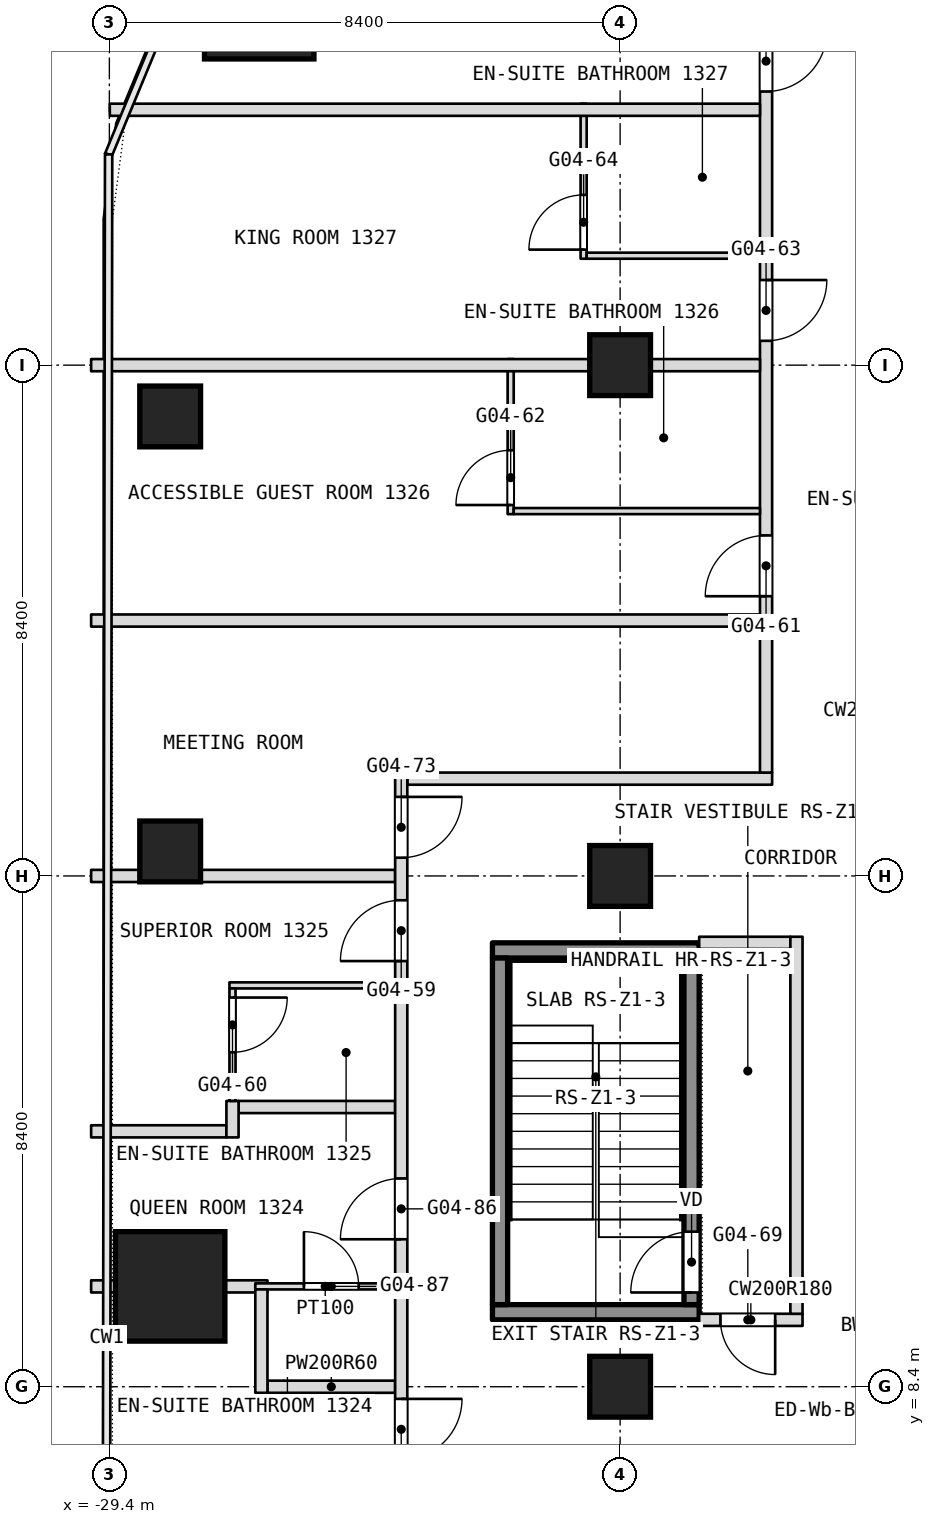
"""IFC4 building model, lengths in metres.
Left out: names, types, materials, properties, quantities, classifications, styles, units other than length and angle.
Written with IfcOpenShell. Run it as: python <this file> out.ifc"""

import sys

from ifc_helpers import new_model, si_unit, direction, frame, frame_2d, origin, origin_2d, place, context, subcontext, project, spatial, rectangle, extrude, element, fill, save


model = new_model("IFC4")
c1 = context("Model", 3, precision=1e-05, world=origin(), true_north=direction((0.0, 1.0)))
c2 = subcontext(c1, "Body", "Model", "MODEL_VIEW")
j1 = project(units=[si_unit("LENGTHUNIT", "METRE"), si_unit("PLANEANGLEUNIT", "RADIAN")], contexts=[c1])
p1 = place(None, origin())
s1 = spatial("IfcSite", under=j1, at=p1, CompositionType="ELEMENT")
p2 = place(p1, origin())
s2 = spatial("IfcBuilding", under=s1, at=p2, CompositionType="ELEMENT")
p3 = place(p2, frame((0.0, 0.0, 61.7)))
s3 = spatial("IfcBuildingStorey", under=s2, at=p3, CompositionType="ELEMENT", Elevation=61.7)
for number, where, z_axis, x_axis in (
    (1, (-26.936, 31.135, 0.0), (0.0, 0.0, 1.0), (1.0, 0.0, 0.0)),
    (2, (-28.4, 10.05, 0.0), (0.0, 0.0, 1.0), (1.0, 0.0, 0.0)),
):
    element("IfcColumn", number, at=place(p3, frame(where, z_axis=z_axis, x_axis=x_axis)), inside=s3, PredefinedType="COLUMN", context=c2, shape_type="SweptSolid", body=[
        extrude(rectangle(XDim=1.8, YDim=1.8, at=origin_2d()), origin(), (0.0, 0.0, 1.0), 3.6),
    ])
for number, where, z_axis, x_axis in (
    (3, (-21.0, 8.4, 0.0), (0.0, 0.0, 1.0), (1.0, 0.0, 0.0)),
    (4, (-21.0, 16.8, 0.0), (0.0, 0.0, 1.0), (1.0, 0.0, 0.0)),
    (5, (-21.0, 25.2, 0.0), (0.0, 0.0, 1.0), (1.0, 0.0, 0.0)),
    (6, (-28.4, 17.203, 0.0), (0.0, 0.0, 1.0), (1.0, 0.0, 0.0)),
    (7, (-28.4, 24.356, 0.0), (0.0, 0.0, 1.0), (1.0, 0.0, 0.0)),
):
    element("IfcColumn", number, at=place(p3, frame(where, z_axis=z_axis, x_axis=x_axis)), inside=s3, PredefinedType="COLUMN", context=c2, shape_type="SweptSolid", body=[
        extrude(rectangle(XDim=1.0, YDim=1.0, at=origin_2d()), origin(), (0.0, 0.0, 1.0), 3.6),
    ])
p4 = place(p3, frame((-26.8, 8.4, 0.0), z_axis=(0.0, 0.0, 1.0), x_axis=(1.0, 0.0, 0.0)))
e8 = element("IfcWall", 8, at=p4, inside=s3, PredefinedType="PARTITIONING", context=c2, shape_type="SweptSolid", body=[
    extrude(rectangle(XDim=2.1, YDim=0.2, at=frame_2d((1.05, 0.0))), origin(), (0.0, 0.0, 1.0), 2.84),
])
p5 = place(p3, frame((-19.7, 9.5, 0.0), z_axis=(0.0, 0.0, 1.0), x_axis=(1.0, 0.0, 0.0)))
e9 = element("IfcWall", 9, at=p5, inside=s3, PredefinedType="PARTITIONING", context=c2, shape_type="SweptSolid", body=[
    extrude(rectangle(XDim=1.7, YDim=0.2, at=frame_2d((0.85, 0.0))), origin(), (0.0, 0.0, 1.0), 3.34),
])
p6 = place(p5, frame((0.35, 0.0, 0.0)))
e10 = element("IfcOpeningElement", 10, at=p6, cuts=e9, PredefinedType="OPENING", context=c2, shape_type="SweptSolid", body=[
    extrude(rectangle(XDim=0.9, YDim=2.1, at=frame_2d((0.45, 1.05))), frame((0.0, 0.1, 0.0), z_axis=(0.0, -1.0, 0.0), x_axis=(1.0, 0.0, 0.0)), (0.0, 0.0, 1.0), 0.2),
])
p7 = place(p3, frame((-29.7, 10.05, 0.0), z_axis=(0.0, 0.0, 1.0), x_axis=(1.0, 0.0, 0.0)))
e11 = element("IfcWall", 11, at=p7, inside=s3, PredefinedType="PARTITIONING", context=c2, shape_type="SweptSolid", body=[
    extrude(rectangle(XDim=0.4, YDim=0.2, at=frame_2d((0.2, 0.0))), origin(), (0.0, 0.0, 1.0), 3.34),
])
p8 = place(p3, frame((-27.5, 10.05, 0.0), z_axis=(0.0, 0.0, 1.0), x_axis=(1.0, 0.0, 0.0)))
e12 = element("IfcWall", 12, at=p8, inside=s3, PredefinedType="PARTITIONING", context=c2, shape_type="SweptSolid", body=[
    extrude(rectangle(XDim=0.7, YDim=0.2, at=frame_2d((0.35, 0.0))), origin(), (0.0, 0.0, 1.0), 3.34),
])
p9 = place(p3, frame((-27.0, 10.05, 0.0), z_axis=(0.0, 0.0, 1.0), x_axis=(1.0, 0.0, 0.0)))
e13 = element("IfcWall", 13, at=p9, inside=s3, PredefinedType="PARTITIONING", context=c2, shape_type="SweptSolid", body=[
    extrude(rectangle(XDim=2.3, YDim=0.1, at=frame_2d((1.15, 0.0))), origin(), (0.0, 0.0, 1.0), 3.34),
])
p10 = place(p9, frame((0.8, 0.0, 0.0)))
e14 = element("IfcOpeningElement", 14, at=p10, cuts=e13, PredefinedType="OPENING", context=c2, shape_type="SweptSolid", body=[
    extrude(rectangle(XDim=0.9, YDim=2.1, at=frame_2d((0.45, 1.05))), frame((0.0, 0.05, 0.0), z_axis=(0.0, -1.0, 0.0), x_axis=(1.0, 0.0, 0.0)), (0.0, 0.0, 1.0), 0.1),
])
p11 = place(p3, frame((-29.7, 12.6, 0.0), z_axis=(0.0, 0.0, 1.0), x_axis=(1.0, 0.0, 0.0)))
e15 = element("IfcWall", 15, at=p11, inside=s3, PredefinedType="PARTITIONING", context=c2, shape_type="SweptSolid", body=[
    extrude(rectangle(XDim=2.225, YDim=0.2, at=frame_2d((1.112, 0.0))), origin(), (0.0, 0.0, 1.0), 3.34),
])
p12 = place(p3, frame((-27.275, 13.0, 0.0), z_axis=(0.0, 0.0, 1.0), x_axis=(1.0, 0.0, 0.0)))
e16 = element("IfcWall", 16, at=p12, inside=s3, PredefinedType="PARTITIONING", context=c2, shape_type="SweptSolid", body=[
    extrude(rectangle(XDim=2.575, YDim=0.2, at=frame_2d((1.288, 0.0))), origin(), (0.0, 0.0, 1.0), 3.34),
])
p13 = place(p3, frame((-27.425, 15.0, 0.0), z_axis=(0.0, 0.0, 1.0), x_axis=(1.0, 0.0, 0.0)))
e17 = element("IfcWall", 17, at=p13, inside=s3, PredefinedType="PARTITIONING", context=c2, shape_type="SweptSolid", body=[
    extrude(rectangle(XDim=2.725, YDim=0.1, at=frame_2d((1.363, 0.0))), origin(), (0.0, 0.0, 1.0), 3.34),
])
p14 = place(p3, frame((-19.7, 15.7, 0.0), z_axis=(0.0, 0.0, 1.0), x_axis=(1.0, 0.0, 0.0)))
e18 = element("IfcWall", 18, at=p14, inside=s3, PredefinedType="PARTITIONING", context=c2, shape_type="SweptSolid", body=[
    extrude(rectangle(XDim=1.5, YDim=0.2, at=frame_2d((0.75, 0.0))), origin(), (0.0, 0.0, 1.0), 3.34),
])
p15 = place(p3, frame((-29.7, 16.8, 0.0), z_axis=(0.0, 0.0, 1.0), x_axis=(1.0, 0.0, 0.0)))
e19 = element("IfcWall", 19, at=p15, inside=s3, PredefinedType="PARTITIONING", context=c2, shape_type="SweptSolid", body=[
    extrude(rectangle(XDim=5.0, YDim=0.2, at=frame_2d((2.5, 0.0))), origin(), (0.0, 0.0, 1.0), 2.84),
])
p16 = place(p3, frame((-18.1, 9.6, 0.0), z_axis=(0.0, 0.0, 1.0), x_axis=(0.0, 1.0, 0.0)))
e20 = element("IfcWall", 20, at=p16, inside=s3, PredefinedType="PARTITIONING", context=c2, shape_type="SweptSolid", body=[
    extrude(rectangle(XDim=6.2, YDim=0.2, at=frame_2d((3.1, 0.0))), origin(), (0.0, 0.0, 1.0), 3.34),
])
p17 = place(p3, frame((-24.5, 18.4, 0.0), z_axis=(0.0, 0.0, 1.0), x_axis=(1.0, 0.0, 0.0)))
e21 = element("IfcWall", 21, at=p17, inside=s3, PredefinedType="PARTITIONING", context=c2, shape_type="SweptSolid", body=[
    extrude(rectangle(XDim=6.0, YDim=0.2, at=frame_2d((3.0, 0.0))), origin(), (0.0, 0.0, 1.0), 3.34),
])
p18 = place(p3, frame((-18.6, 18.5, 0.0), z_axis=(0.0, 0.0, 1.0), x_axis=(0.0, 1.0, 0.0)))
e22 = element("IfcWall", 22, at=p18, inside=s3, PredefinedType="PARTITIONING", context=c2, shape_type="SweptSolid", body=[
    extrude(rectangle(XDim=15.04, YDim=0.2, at=frame_2d((7.52, 0.0))), origin(), (0.0, 0.0, 1.0), 3.34),
])
p19 = place(p18, frame((2.9, 0.0, 0.0)))
e23 = element("IfcOpeningElement", 23, at=p19, cuts=e22, PredefinedType="OPENING", context=c2, shape_type="SweptSolid", body=[
    extrude(rectangle(XDim=1.0, YDim=2.1, at=frame_2d((0.5, 1.05))), frame((0.0, 0.1, 0.0), z_axis=(0.0, -1.0, 0.0), x_axis=(1.0, 0.0, 0.0)), (0.0, 0.0, 1.0), 0.2),
])
p20 = place(p18, frame((7.1, 0.0, 0.0)))
e24 = element("IfcOpeningElement", 24, at=p20, cuts=e22, PredefinedType="OPENING", context=c2, shape_type="SweptSolid", body=[
    extrude(rectangle(XDim=1.0, YDim=2.1, at=frame_2d((0.5, 1.05))), frame((0.0, 0.1, 0.0), z_axis=(0.0, -1.0, 0.0), x_axis=(1.0, 0.0, 0.0)), (0.0, 0.0, 1.0), 0.2),
])
p21 = place(p18, frame((11.2, 0.0, 0.0)))
e25 = element("IfcOpeningElement", 25, at=p21, cuts=e22, PredefinedType="OPENING", context=c2, shape_type="SweptSolid", body=[
    extrude(rectangle(XDim=1.0, YDim=2.1, at=frame_2d((0.5, 1.05))), frame((0.0, 0.1, 0.0), z_axis=(0.0, -1.0, 0.0), x_axis=(1.0, 0.0, 0.0)), (0.0, 0.0, 1.0), 0.2),
])
p22 = place(p3, frame((-29.7, 21.0, 0.0), z_axis=(0.0, 0.0, 1.0), x_axis=(1.0, 0.0, 0.0)))
e26 = element("IfcWall", 26, at=p22, inside=s3, PredefinedType="PARTITIONING", context=c2, shape_type="SweptSolid", body=[
    extrude(rectangle(XDim=11.0, YDim=0.2, at=frame_2d((5.5, 0.0))), origin(), (0.0, 0.0, 1.0), 3.34),
])
p23 = place(p3, frame((-21.6, 26.95, 0.0), z_axis=(0.0, 0.0, 1.0), x_axis=(0.0, 1.0, 0.0)))
e27 = element("IfcWall", 27, at=p23, inside=s3, PredefinedType="PARTITIONING", context=c2, shape_type="SweptSolid", body=[
    extrude(rectangle(XDim=2.55, YDim=0.1, at=frame_2d((1.275, 0.0))), origin(), (0.0, 0.0, 1.0), 3.34),
])
p24 = place(p23, frame((0.15, 0.0, 0.0)))
e28 = element("IfcOpeningElement", 28, at=p24, cuts=e27, PredefinedType="OPENING", context=c2, shape_type="SweptSolid", body=[
    extrude(rectangle(XDim=0.9, YDim=2.1, at=frame_2d((0.45, 1.05))), frame((0.0, 0.05, 0.0), z_axis=(0.0, -1.0, 0.0), x_axis=(1.0, 0.0, 0.0)), (0.0, 0.0, 1.0), 0.1),
])
p25 = place(p3, frame((-22.8, 22.75, 0.0), z_axis=(0.0, 0.0, 1.0), x_axis=(0.0, 1.0, 0.0)))
e29 = element("IfcWall", 29, at=p25, inside=s3, PredefinedType="PARTITIONING", context=c2, shape_type="SweptSolid", body=[
    extrude(rectangle(XDim=2.55, YDim=0.1, at=frame_2d((1.275, 0.0))), origin(), (0.0, 0.0, 1.0), 3.34),
])
p26 = place(p25, frame((0.15, 0.0, 0.0)))
e30 = element("IfcOpeningElement", 30, at=p26, cuts=e29, PredefinedType="OPENING", context=c2, shape_type="SweptSolid", body=[
    extrude(rectangle(XDim=0.9, YDim=2.1, at=frame_2d((0.45, 1.05))), frame((0.0, 0.05, 0.0), z_axis=(0.0, -1.0, 0.0), x_axis=(1.0, 0.0, 0.0)), (0.0, 0.0, 1.0), 0.1),
])
p27 = place(p3, frame((-22.75, 22.8, 0.0), z_axis=(0.0, 0.0, 1.0), x_axis=(1.0, 0.0, 0.0)))
e31 = element("IfcWall", 31, at=p27, inside=s3, PredefinedType="PARTITIONING", context=c2, shape_type="SweptSolid", body=[
    extrude(rectangle(XDim=4.05, YDim=0.1, at=frame_2d((2.025, 0.0))), origin(), (0.0, 0.0, 1.0), 3.34),
])
p28 = place(p3, frame((-24.6, 6.9, 0.0), z_axis=(0.0, 0.0, 1.0), x_axis=(0.0, 1.0, 0.0)))
e32 = element("IfcWall", 32, at=p28, inside=s3, PredefinedType="PARTITIONING", context=c2, shape_type="SweptSolid", body=[
    extrude(rectangle(XDim=11.6, YDim=0.2, at=frame_2d((5.8, 0.0))), origin(), (0.0, 0.0, 1.0), 3.34),
])
p29 = place(p28, frame((8.5, 0.0, 0.0)))
e33 = element("IfcOpeningElement", 33, at=p29, cuts=e32, PredefinedType="OPENING", context=c2, shape_type="SweptSolid", body=[
    extrude(rectangle(XDim=1.0, YDim=2.1, at=frame_2d((0.5, 1.05))), frame((0.0, 0.1, 0.0), z_axis=(0.0, -1.0, 0.0), x_axis=(1.0, 0.0, 0.0)), (0.0, 0.0, 1.0), 0.2),
])
p30 = place(p28, frame((10.2, 0.0, 0.0)))
e34 = element("IfcOpeningElement", 34, at=p30, cuts=e32, PredefinedType="OPENING", context=c2, shape_type="SweptSolid", body=[
    extrude(rectangle(XDim=1.0, YDim=2.1, at=frame_2d((0.5, 1.05))), frame((0.0, 0.1, 0.0), z_axis=(0.0, -1.0, 0.0), x_axis=(1.0, 0.0, 0.0)), (0.0, 0.0, 1.0), 0.2),
])
p31 = place(p28, frame((0.3, 0.0, 0.0)))
e35 = element("IfcOpeningElement", 35, at=p31, cuts=e32, PredefinedType="OPENING", context=c2, shape_type="SweptSolid", body=[
    extrude(rectangle(XDim=1.0, YDim=2.1, at=frame_2d((0.5, 1.05))), frame((0.0, 0.1, 0.0), z_axis=(0.0, -1.0, 0.0), x_axis=(1.0, 0.0, 0.0)), (0.0, 0.0, 1.0), 0.2),
])
p32 = place(p28, frame((3.925, 0.0, 0.0)))
e36 = element("IfcOpeningElement", 36, at=p32, cuts=e32, PredefinedType="OPENING", context=c2, shape_type="SweptSolid", body=[
    extrude(rectangle(XDim=1.0, YDim=2.1, at=frame_2d((0.5, 1.05))), frame((0.0, 0.1, 0.0), z_axis=(0.0, -1.0, 0.0), x_axis=(1.0, 0.0, 0.0)), (0.0, 0.0, 1.0), 0.2),
])
p33 = place(p3, frame((-29.7, 25.2, 0.0), z_axis=(0.0, 0.0, 1.0), x_axis=(1.0, 0.0, 0.0)))
e37 = element("IfcWall", 37, at=p33, inside=s3, PredefinedType="PARTITIONING", context=c2, shape_type="SweptSolid", body=[
    extrude(rectangle(XDim=11.0, YDim=0.2, at=frame_2d((5.5, 0.0))), origin(), (0.0, 0.0, 1.0), 2.84),
])
p34 = place(p3, frame((-26.9, 8.3, 0.0), z_axis=(0.0, 0.0, 1.0), x_axis=(0.0, 1.0, 0.0)))
e38 = element("IfcWall", 38, at=p34, inside=s3, PredefinedType="PARTITIONING", context=c2, shape_type="SweptSolid", body=[
    extrude(rectangle(XDim=1.7, YDim=0.2, at=frame_2d((0.85, 0.0))), origin(), (0.0, 0.0, 1.0), 3.34),
])
p35 = place(p3, frame((-21.55, 27.0, 0.0), z_axis=(0.0, 0.0, 1.0), x_axis=(1.0, 0.0, 0.0)))
e39 = element("IfcWall", 39, at=p35, inside=s3, PredefinedType="PARTITIONING", context=c2, shape_type="SweptSolid", body=[
    extrude(rectangle(XDim=2.85, YDim=0.1, at=frame_2d((1.425, 0.0))), origin(), (0.0, 0.0, 1.0), 3.34),
])
p36 = place(p3, frame((-27.375, 12.5, 0.0), z_axis=(0.0, 0.0, 1.0), x_axis=(0.0, 1.0, 0.0)))
e40 = element("IfcWall", 40, at=p36, inside=s3, PredefinedType="PARTITIONING", context=c2, shape_type="SweptSolid", body=[
    extrude(rectangle(XDim=0.6, YDim=0.2, at=frame_2d((0.3, 0.0))), origin(), (0.0, 0.0, 1.0), 3.34),
])
p37 = place(p3, frame((-27.375, 13.1, 0.0), z_axis=(0.0, 0.0, 1.0), x_axis=(0.0, 1.0, 0.0)))
e41 = element("IfcWall", 41, at=p37, inside=s3, PredefinedType="PARTITIONING", context=c2, shape_type="SweptSolid", body=[
    extrude(rectangle(XDim=1.85, YDim=0.1, at=frame_2d((0.925, 0.0))), origin(), (0.0, 0.0, 1.0), 3.34),
])
p38 = place(p37, frame((0.8, 0.0, 0.0)))
e42 = element("IfcOpeningElement", 42, at=p38, cuts=e41, PredefinedType="OPENING", context=c2, shape_type="SweptSolid", body=[
    extrude(rectangle(XDim=0.9, YDim=2.1, at=frame_2d((0.45, 1.05))), frame((0.0, 0.05, 0.0), z_axis=(0.0, -1.0, 0.0), x_axis=(1.0, 0.0, 0.0)), (0.0, 0.0, 1.0), 0.1),
])
p39 = place(p3, frame((-29.393, 29.4, 0.0), z_axis=(0.0, 0.0, 1.0), x_axis=(1.0, 0.0, 0.0)))
e43 = element("IfcWall", 43, at=p39, inside=s3, PredefinedType="PARTITIONING", context=c2, shape_type="SweptSolid", body=[
    extrude(rectangle(XDim=10.693, YDim=0.2, at=frame_2d((5.347, 0.0))), origin(), (0.0, 0.0, 1.0), 3.34),
])
for number, where, z_axis, x_axis in (
    (44, (-23.1, 9.625, 0.1), (0.0, 0.0, 1.0), (1.0, 0.0, 0.0)),
    (45, (-23.1, 15.575, 0.1), (0.0, 0.0, 1.0), (1.0, 0.0, 0.0)),
):
    element("IfcWall", number, at=place(p3, frame(where, z_axis=z_axis, x_axis=x_axis)), inside=s3, PredefinedType="SHEAR", context=c2, shape_type="SweptSolid", body=[
        extrude(rectangle(XDim=3.4, YDim=0.25, at=frame_2d((1.7, 0.0))), origin(), (0.0, 0.0, 1.0), 3.6),
    ])
p40 = place(p3, frame((-22.975, 9.75, 0.1), z_axis=(0.0, 0.0, 1.0), x_axis=(0.0, 1.0, 0.0)))
e46 = element("IfcWall", 46, at=p40, inside=s3, PredefinedType="SHEAR", context=c2, shape_type="SweptSolid", body=[
    extrude(rectangle(XDim=5.7, YDim=0.25, at=frame_2d((2.85, 0.0))), origin(), (0.0, 0.0, 1.0), 3.6),
])
p41 = place(p3, frame((-19.825, 9.75, 0.1), z_axis=(0.0, 0.0, 1.0), x_axis=(0.0, 1.0, 0.0)))
e47 = element("IfcWall", 47, at=p41, inside=s3, PredefinedType="SHEAR", context=c2, shape_type="SweptSolid", body=[
    extrude(rectangle(XDim=5.7, YDim=0.25, at=frame_2d((2.85, 0.0))), origin(), (0.0, 0.0, 1.0), 3.6),
])
p42 = place(p41, frame((0.2, 0.0, 0.0)))
e48 = element("IfcOpeningElement", 48, at=p42, cuts=e47, PredefinedType="OPENING", context=c2, shape_type="SweptSolid", body=[
    extrude(rectangle(XDim=1.0, YDim=2.1, at=frame_2d((0.5, 1.05))), frame((0.0, 0.125, 0.0), z_axis=(0.0, -1.0, 0.0), x_axis=(1.0, 0.0, 0.0)), (0.0, 0.0, 1.0), 0.25),
])
p43 = place(p6, origin())
e49 = element("IfcDoor", 49, at=p43, inside=s3, OperationType="SINGLE_SWING_RIGHT", PredefinedType="DOOR", context=c2, shape_type="SweptSolid", body=[
    extrude(rectangle(XDim=0.9, YDim=2.1, at=frame_2d((0.45, 1.05))), frame((0.0, 0.025, 0.0), z_axis=(0.0, -1.0, 0.0), x_axis=(1.0, 0.0, 0.0)), (0.0, 0.0, 1.0), 0.05),
])
fill(e10, e49)
p44 = place(p10, origin())
e50 = element("IfcDoor", 50, at=p44, inside=s3, OperationType="SINGLE_SWING_LEFT", PredefinedType="DOOR", context=c2, shape_type="SweptSolid", body=[
    extrude(rectangle(XDim=0.9, YDim=2.1, at=frame_2d((0.45, 1.05))), frame((0.0, 0.025, 0.0), z_axis=(0.0, -1.0, 0.0), x_axis=(1.0, 0.0, 0.0)), (0.0, 0.0, 1.0), 0.05),
])
fill(e14, e50)
p45 = place(p19, origin())
e51 = element("IfcDoor", 51, at=p45, inside=s3, OperationType="SINGLE_SWING_RIGHT", PredefinedType="DOOR", context=c2, shape_type="SweptSolid", body=[
    extrude(rectangle(XDim=1.0, YDim=2.1, at=frame_2d((0.5, 1.05))), frame((0.0, 0.025, 0.0), z_axis=(0.0, -1.0, 0.0), x_axis=(1.0, 0.0, 0.0)), (0.0, 0.0, 1.0), 0.05),
])
fill(e23, e51)
p46 = place(p20, origin())
e52 = element("IfcDoor", 52, at=p46, inside=s3, OperationType="SINGLE_SWING_RIGHT", PredefinedType="DOOR", context=c2, shape_type="SweptSolid", body=[
    extrude(rectangle(XDim=1.0, YDim=2.1, at=frame_2d((0.5, 1.05))), frame((0.0, 0.025, 0.0), z_axis=(0.0, -1.0, 0.0), x_axis=(1.0, 0.0, 0.0)), (0.0, 0.0, 1.0), 0.05),
])
fill(e24, e52)
p47 = place(p21, origin())
e53 = element("IfcDoor", 53, at=p47, inside=s3, OperationType="SINGLE_SWING_RIGHT", PredefinedType="DOOR", context=c2, shape_type="SweptSolid", body=[
    extrude(rectangle(XDim=1.0, YDim=2.1, at=frame_2d((0.5, 1.05))), frame((0.0, 0.025, 0.0), z_axis=(0.0, -1.0, 0.0), x_axis=(1.0, 0.0, 0.0)), (0.0, 0.0, 1.0), 0.05),
])
fill(e25, e53)
p48 = place(p24, origin())
e54 = element("IfcDoor", 54, at=p48, inside=s3, OperationType="SINGLE_SWING_RIGHT", PredefinedType="DOOR", context=c2, shape_type="SweptSolid", body=[
    extrude(rectangle(XDim=0.9, YDim=2.1, at=frame_2d((0.45, 1.05))), frame((0.0, 0.025, 0.0), z_axis=(0.0, -1.0, 0.0), x_axis=(1.0, 0.0, 0.0)), (0.0, 0.0, 1.0), 0.05),
])
fill(e28, e54)
p49 = place(p26, origin())
e55 = element("IfcDoor", 55, at=p49, inside=s3, OperationType="SINGLE_SWING_RIGHT", PredefinedType="DOOR", context=c2, shape_type="SweptSolid", body=[
    extrude(rectangle(XDim=0.9, YDim=2.1, at=frame_2d((0.45, 1.05))), frame((0.0, 0.025, 0.0), z_axis=(0.0, -1.0, 0.0), x_axis=(1.0, 0.0, 0.0)), (0.0, 0.0, 1.0), 0.05),
])
fill(e30, e55)
p50 = place(p29, origin())
e56 = element("IfcDoor", 56, at=p50, inside=s3, OperationType="SINGLE_SWING_RIGHT", PredefinedType="DOOR", context=c2, shape_type="SweptSolid", body=[
    extrude(rectangle(XDim=1.0, YDim=2.1, at=frame_2d((0.5, 1.05))), frame((0.0, 0.025, 0.0), z_axis=(0.0, -1.0, 0.0), x_axis=(1.0, 0.0, 0.0)), (0.0, 0.0, 1.0), 0.05),
])
fill(e33, e56)
p51 = place(p30, origin())
e57 = element("IfcDoor", 57, at=p51, inside=s3, OperationType="SINGLE_SWING_LEFT", PredefinedType="DOOR", context=c2, shape_type="SweptSolid", body=[
    extrude(rectangle(XDim=1.0, YDim=2.1, at=frame_2d((0.5, 1.05))), frame((0.0, 0.025, 0.0), z_axis=(0.0, -1.0, 0.0), x_axis=(1.0, 0.0, 0.0)), (0.0, 0.0, 1.0), 0.05),
])
fill(e34, e57)
p52 = place(p31, origin())
e58 = element("IfcDoor", 58, at=p52, inside=s3, OperationType="SINGLE_SWING_LEFT", PredefinedType="DOOR", context=c2, shape_type="SweptSolid", body=[
    extrude(rectangle(XDim=1.0, YDim=2.1, at=frame_2d((0.5, 1.05))), frame((0.0, 0.025, 0.0), z_axis=(0.0, -1.0, 0.0), x_axis=(1.0, 0.0, 0.0)), (0.0, 0.0, 1.0), 0.05),
])
fill(e35, e58)
p53 = place(p32, origin())
e59 = element("IfcDoor", 59, at=p53, inside=s3, OperationType="SINGLE_SWING_LEFT", PredefinedType="DOOR", context=c2, shape_type="SweptSolid", body=[
    extrude(rectangle(XDim=1.0, YDim=2.1, at=frame_2d((0.5, 1.05))), frame((0.0, 0.025, 0.0), z_axis=(0.0, -1.0, 0.0), x_axis=(1.0, 0.0, 0.0)), (0.0, 0.0, 1.0), 0.05),
])
fill(e36, e59)
p54 = place(p38, origin())
e60 = element("IfcDoor", 60, at=p54, inside=s3, OperationType="SINGLE_SWING_LEFT", PredefinedType="DOOR", context=c2, shape_type="SweptSolid", body=[
    extrude(rectangle(XDim=0.9, YDim=2.1, at=frame_2d((0.45, 1.05))), frame((0.0, 0.025, 0.0), z_axis=(0.0, -1.0, 0.0), x_axis=(1.0, 0.0, 0.0)), (0.0, 0.0, 1.0), 0.05),
])
fill(e42, e60)
p55 = place(p42, origin())
e61 = element("IfcDoor", 61, at=p55, inside=s3, OperationType="SINGLE_SWING_LEFT", PredefinedType="DOOR", context=c2, shape_type="SweptSolid", body=[
    extrude(rectangle(XDim=1.0, YDim=2.1, at=frame_2d((0.5, 1.05))), frame((0.0, 0.025, 0.0), z_axis=(0.0, -1.0, 0.0), x_axis=(1.0, 0.0, 0.0)), (0.0, 0.0, 1.0), 0.05),
])
fill(e48, e61)
save(model, sys.argv[1])
